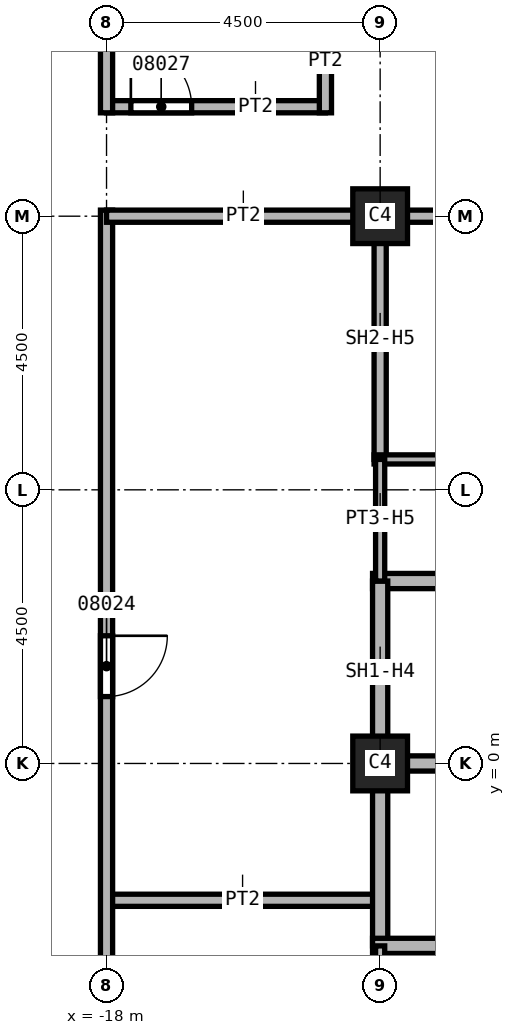
"""IFC4 building model, lengths in metres.
Left out: names, types, materials, properties, quantities, classifications, styles, units other than length and angle.
Written with IfcOpenShell. Run it as: python <this file> out.ifc"""

import sys

from ifc_helpers import new_model, si_unit, direction, frame, frame_2d, origin, origin_2d, place, context, subcontext, project, spatial, rectangle, extrude, element, fill, save


model = new_model("IFC4")
c1 = context("Model", 3, precision=1e-05, world=origin(), true_north=direction((0.0, 1.0)))
c2 = subcontext(c1, "Body", "Model", "MODEL_VIEW")
j1 = project(units=[si_unit("LENGTHUNIT", "METRE"), si_unit("PLANEANGLEUNIT", "RADIAN")], contexts=[c1])
p1 = place(None, origin())
s1 = spatial("IfcSite", under=j1, at=p1, CompositionType="ELEMENT")
p2 = place(p1, origin())
s2 = spatial("IfcBuilding", under=s1, at=p2, CompositionType="ELEMENT")
p3 = place(p2, frame((0.0, 0.0, 150.0)))
s3 = spatial("IfcBuildingStorey", under=s2, at=p3, CompositionType="ELEMENT", Elevation=150.0)
for number, where, z_axis, x_axis in (
    (1, (-13.5, 0.0, 0.0), (0.0, 0.0, 1.0), (1.0, 0.0, 0.0)),
    (2, (-13.5, 9.0, 0.0), (0.0, 0.0, 1.0), (1.0, 0.0, 0.0)),
):
    element("IfcColumn", number, at=place(p3, frame(where, z_axis=z_axis, x_axis=x_axis)), inside=s3, PredefinedType="COLUMN", context=c2, shape_type="SweptSolid", body=[
        extrude(rectangle(XDim=0.9, YDim=0.9, at=origin_2d()), origin(), (0.0, 0.0, 1.0), 3.7),
    ])
p4 = place(p3, frame((-18.0, -2.25, 0.0), z_axis=(0.0, 0.0, 1.0), x_axis=(1.0, 0.0, 0.0)))
e3 = element("IfcWall", 3, at=p4, inside=s3, PredefinedType="PARTITIONING", context=c2, shape_type="SweptSolid", body=[
    extrude(rectangle(XDim=4.5, YDim=0.2, at=frame_2d((2.25, 0.0))), origin(), (0.0, 0.0, 1.0), 3.7),
])
p5 = place(p3, frame((-18.0, 9.1, 0.0), z_axis=(0.0, 0.0, 1.0), x_axis=(0.0, -1.0, 0.0)))
e4 = element("IfcWall", 4, at=p5, inside=s3, PredefinedType="PARTITIONING", context=c2, shape_type="SweptSolid", body=[
    extrude(rectangle(XDim=18.2, YDim=0.2, at=frame_2d((9.1, 0.0))), origin(), (0.0, 0.0, 1.0), 3.7),
])
p6 = place(p5, frame((16.9, 0.0, 0.0)))
e5 = element("IfcOpeningElement", 5, at=p6, cuts=e4, PredefinedType="OPENING", context=c2, shape_type="SweptSolid", body=[
    extrude(rectangle(XDim=1.0, YDim=2.1, at=frame_2d((0.5, 1.05))), frame((0.0, 0.1, 0.0), z_axis=(0.0, -1.0, 0.0), x_axis=(1.0, 0.0, 0.0)), (0.0, 0.0, 1.0), 0.2),
])
p7 = place(p5, frame((7.0, 0.0, 0.0)))
e6 = element("IfcOpeningElement", 6, at=p7, cuts=e4, PredefinedType="OPENING", context=c2, shape_type="SweptSolid", body=[
    extrude(rectangle(XDim=1.0, YDim=2.1, at=frame_2d((0.5, 1.05))), frame((0.0, 0.1, 0.0), z_axis=(0.0, -1.0, 0.0), x_axis=(1.0, 0.0, 0.0)), (0.0, 0.0, 1.0), 0.2),
])
p8 = place(p3, frame((-18.0, 10.8, 0.0), z_axis=(0.0, 0.0, 1.0), x_axis=(1.0, 0.0, 0.0)))
e7 = element("IfcWall", 7, at=p8, inside=s3, PredefinedType="PARTITIONING", context=c2, shape_type="SweptSolid", body=[
    extrude(rectangle(XDim=3.6, YDim=0.2, at=frame_2d((1.8, 0.0))), origin(), (0.0, 0.0, 1.0), 3.7),
])
p9 = place(p8, frame((0.4, 0.0, 0.0)))
e8 = element("IfcOpeningElement", 8, at=p9, cuts=e7, PredefinedType="OPENING", context=c2, shape_type="SweptSolid", body=[
    extrude(rectangle(XDim=1.0, YDim=2.1, at=frame_2d((0.5, 1.05))), frame((0.0, 0.1, 0.0), z_axis=(0.0, -1.0, 0.0), x_axis=(1.0, 0.0, 0.0)), (0.0, 0.0, 1.0), 0.2),
])
p10 = place(p3, frame((-18.0, 13.6, 0.0), z_axis=(0.0, 0.0, 1.0), x_axis=(0.0, -1.0, 0.0)))
e9 = element("IfcWall", 9, at=p10, inside=s3, PredefinedType="PARTITIONING", context=c2, shape_type="SweptSolid", body=[
    extrude(rectangle(XDim=2.9, YDim=0.2, at=frame_2d((1.45, 0.0))), origin(), (0.0, 0.0, 1.0), 3.7),
])
p11 = place(p3, frame((-13.5, 9.0, 0.0), z_axis=(0.0, 0.0, 1.0), x_axis=(-1.0, 0.0, 0.0)))
e10 = element("IfcWall", 10, at=p11, inside=s3, PredefinedType="PARTITIONING", context=c2, shape_type="SweptSolid", body=[
    extrude(rectangle(XDim=4.5, YDim=0.2, at=frame_2d((2.25, 0.0))), origin(), (0.0, 0.0, 1.0), 3.7),
])
p12 = place(p3, frame((-14.4, 10.7, 0.0), z_axis=(0.0, 0.0, 1.0), x_axis=(0.0, 1.0, 0.0)))
e11 = element("IfcWall", 11, at=p12, inside=s3, PredefinedType="PARTITIONING", context=c2, shape_type="SweptSolid", body=[
    extrude(rectangle(XDim=1.6, YDim=0.2, at=frame_2d((0.8, 0.0))), origin(), (0.0, 0.0, 1.0), 3.7),
])
p13 = place(p3, frame((-13.6, 9.0, 0.0), z_axis=(0.0, 0.0, 1.0), x_axis=(1.0, 0.0, 0.0)))
e12 = element("IfcWall", 12, at=p13, inside=s3, PredefinedType="SOLIDWALL", context=c2, shape_type="SweptSolid", body=[
    extrude(rectangle(XDim=3.1, YDim=0.2, at=frame_2d((1.55, 0.0))), origin(), (0.0, 0.0, 1.0), 2.938),
])
p14 = place(p3, frame((-13.5, 5.0, 0.0), z_axis=(0.0, 0.0, 1.0), x_axis=(0.0, 1.0, 0.0)))
e13 = element("IfcWall", 13, at=p14, inside=s3, PredefinedType="SOLIDWALL", context=c2, shape_type="SweptSolid", body=[
    extrude(rectangle(XDim=4.1, YDim=0.2, at=frame_2d((2.05, 0.0))), origin(), (0.0, 0.0, 1.0), 2.938),
])
p15 = place(p3, frame((-13.625, 0.0, 0.0), z_axis=(0.0, 0.0, 1.0), x_axis=(1.0, 0.0, 0.0)))
e14 = element("IfcWall", 14, at=p15, inside=s3, PredefinedType="SOLIDWALL", context=c2, shape_type="SweptSolid", body=[
    extrude(rectangle(XDim=3.125, YDim=0.25, at=frame_2d((1.562, 0.0))), origin(), (0.0, 0.0, 1.0), 3.7),
])
p16 = place(p3, frame((-13.625, 3.0, 0.0), z_axis=(0.0, 0.0, 1.0), x_axis=(1.0, 0.0, 0.0)))
e15 = element("IfcWall", 15, at=p16, inside=s3, PredefinedType="SOLIDWALL", context=c2, shape_type="SweptSolid", body=[
    extrude(rectangle(XDim=6.125, YDim=0.25, at=frame_2d((3.062, 0.0))), origin(), (0.0, 0.0, 1.0), 3.7),
])
p17 = place(p16, frame((3.25, 0.0, 0.0)))
e16 = element("IfcOpeningElement", 16, at=p17, cuts=e15, PredefinedType="OPENING", context=c2, shape_type="SweptSolid", body=[
    extrude(rectangle(XDim=1.1, YDim=2.1, at=frame_2d((0.55, 1.05))), frame((0.0, 0.125, 0.0), z_axis=(0.0, -1.0, 0.0), x_axis=(1.0, 0.0, 0.0)), (0.0, 0.0, 1.0), 0.25),
])
p18 = place(p3, frame((-13.5, -3.0, 0.0), z_axis=(0.0, 0.0, 1.0), x_axis=(0.0, 1.0, 0.0)))
e17 = element("IfcWall", 17, at=p18, inside=s3, PredefinedType="SOLIDWALL", context=c2, shape_type="SweptSolid", body=[
    extrude(rectangle(XDim=6.0, YDim=0.25, at=frame_2d((3.0, 0.0))), origin(), (0.0, 0.0, 1.0), 2.938),
])
p19 = place(p3, frame((-13.625, -3.0, 0.0), z_axis=(0.0, 0.0, 1.0), x_axis=(1.0, 0.0, 0.0)))
e18 = element("IfcWall", 18, at=p19, inside=s3, PredefinedType="SOLIDWALL", context=c2, shape_type="SweptSolid", body=[
    extrude(rectangle(XDim=9.25, YDim=0.25, at=frame_2d((4.625, 0.0))), origin(), (0.0, 0.0, 1.0), 3.7),
])
p20 = place(p19, frame((3.25, 0.0, 0.0)))
e19 = element("IfcOpeningElement", 19, at=p20, cuts=e18, PredefinedType="OPENING", context=c2, shape_type="SweptSolid", body=[
    extrude(rectangle(XDim=1.1, YDim=2.1, at=frame_2d((0.55, 1.05))), frame((0.0, 0.125, 0.0), z_axis=(0.0, -1.0, 0.0), x_axis=(1.0, 0.0, 0.0)), (0.0, 0.0, 1.0), 0.25),
])
p21 = place(p3, frame((-13.6, 5.0, 0.0), z_axis=(0.0, 0.0, 1.0), x_axis=(1.0, 0.0, 0.0)))
e20 = element("IfcWall", 20, at=p21, inside=s3, PredefinedType="PARTITIONING", context=c2, shape_type="SweptSolid", body=[
    extrude(rectangle(XDim=3.1, YDim=0.15, at=frame_2d((1.55, 0.0))), origin(), (0.0, 0.0, 1.0), 3.7),
])
p22 = place(p3, frame((-13.5, -9.1, 0.0), z_axis=(0.0, 0.0, 1.0), x_axis=(0.0, 1.0, 0.0)))
e21 = element("IfcWall", 21, at=p22, inside=s3, PredefinedType="PARTITIONING", context=c2, shape_type="SweptSolid", body=[
    extrude(rectangle(XDim=6.1, YDim=0.15, at=frame_2d((3.05, 0.0))), origin(), (0.0, 0.0, 1.0), 2.938),
])
p23 = place(p3, frame((-13.5, 3.0, 0.0), z_axis=(0.0, 0.0, 1.0), x_axis=(0.0, 1.0, 0.0)))
e22 = element("IfcWall", 22, at=p23, inside=s3, PredefinedType="PARTITIONING", context=c2, shape_type="SweptSolid", body=[
    extrude(rectangle(XDim=2.0, YDim=0.15, at=frame_2d((1.0, 0.0))), origin(), (0.0, 0.0, 1.0), 2.938),
])
p24 = place(p7, origin())
e23 = element("IfcDoor", 23, at=p24, inside=s3, OperationType="SINGLE_SWING_LEFT", PredefinedType="DOOR", context=c2, shape_type="SweptSolid", body=[
    extrude(rectangle(XDim=1.0, YDim=2.1, at=frame_2d((0.5, 1.05))), frame((0.0, 0.025, 0.0), z_axis=(0.0, -1.0, 0.0), x_axis=(1.0, 0.0, 0.0)), (0.0, 0.0, 1.0), 0.05),
])
fill(e6, e23)
p25 = place(p9, origin())
e24 = element("IfcDoor", 24, at=p25, inside=s3, OperationType="SINGLE_SWING_RIGHT", PredefinedType="DOOR", context=c2, shape_type="SweptSolid", body=[
    extrude(rectangle(XDim=1.0, YDim=2.1, at=frame_2d((0.5, 1.05))), frame((0.0, 0.025, 0.0), z_axis=(0.0, -1.0, 0.0), x_axis=(1.0, 0.0, 0.0)), (0.0, 0.0, 1.0), 0.05),
])
fill(e8, e24)
save(model, sys.argv[1])
